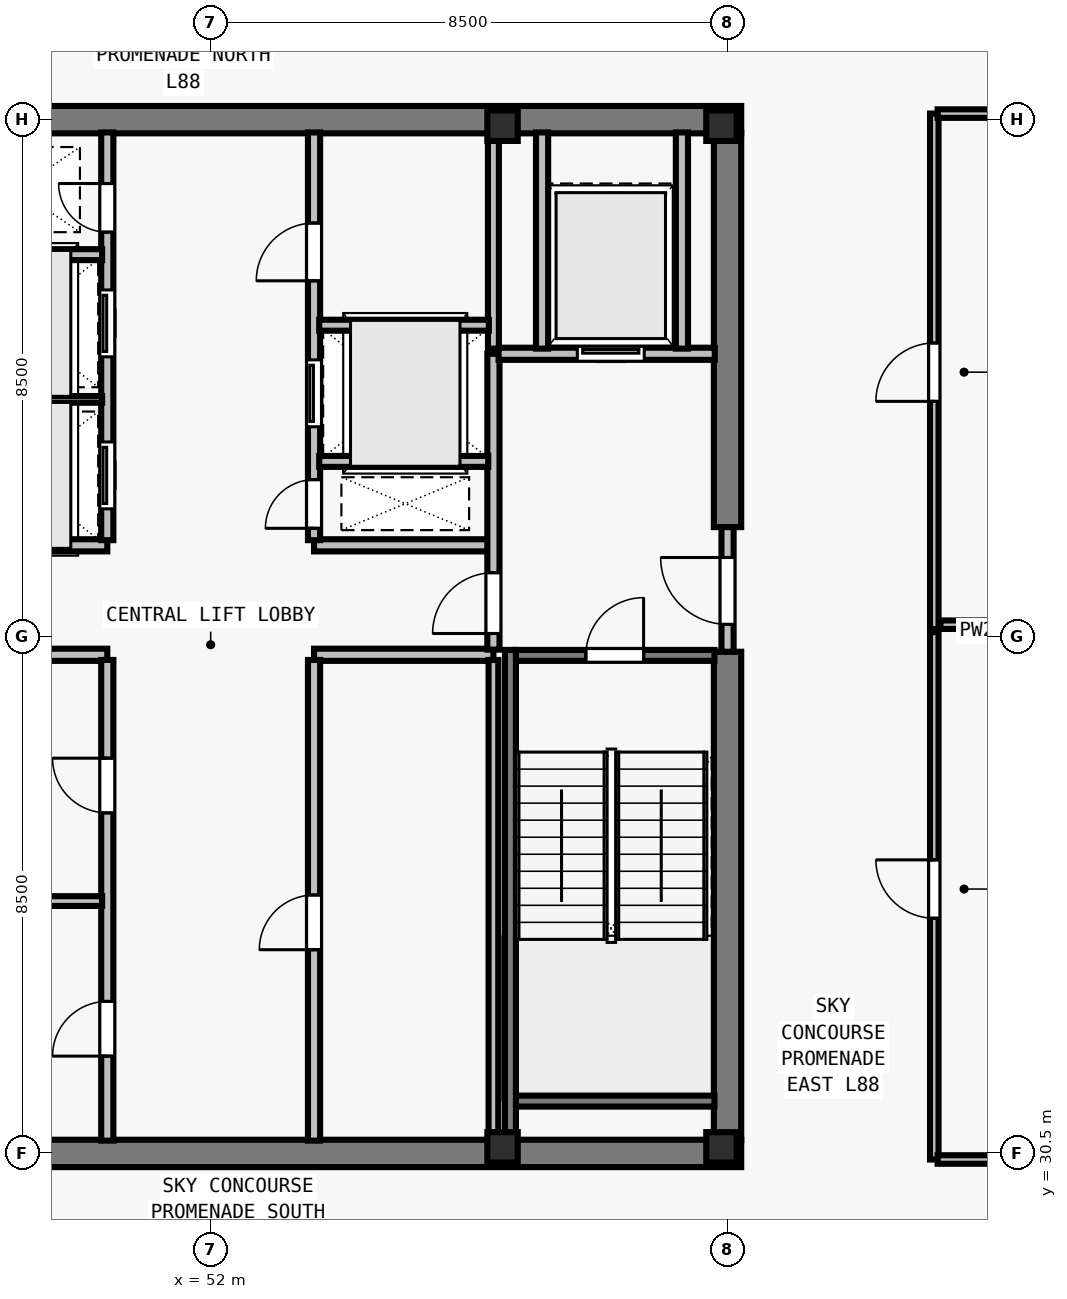
"""IFC4 building model, lengths in metres.
Left out: names, types, materials, properties, quantities, classifications, styles, units other than length and angle.
Written with IfcOpenShell. Run it as: python <this file> out.ifc"""

import sys

from ifc_helpers import new_model, si_unit, direction, frame, frame_2d, origin, origin_2d, place, context, subcontext, project, spatial, rectangle, i_section, extrude, element, fill, save


model = new_model("IFC4")
c1 = context("Model", 3, precision=1e-05, world=origin(), true_north=direction((0.0, 1.0)))
c2 = subcontext(c1, "Body", "Model", "MODEL_VIEW")
j1 = project(units=[si_unit("LENGTHUNIT", "METRE"), si_unit("PLANEANGLEUNIT", "RADIAN")], contexts=[c1])
p1 = place(None, origin())
s1 = spatial("IfcSite", under=j1, at=p1, CompositionType="ELEMENT")
p2 = place(p1, origin())
s2 = spatial("IfcBuilding", under=s1, at=p2, CompositionType="ELEMENT")
p3 = place(p2, frame((0.0, 0.0, 320.0)))
s3 = spatial("IfcBuildingStorey", under=s2, at=p3, CompositionType="ELEMENT", Elevation=320.0)
for number, where, z_axis, x_axis in (
    (1, (56.8, 30.6, 0.0), (0.0, 0.0, 1.0), (1.0, 0.0, 0.0)),
    (2, (60.4, 30.6, 0.0), (0.0, 0.0, 1.0), (1.0, 0.0, 0.0)),
    (3, (56.8, 47.4, 0.0), (0.0, 0.0, 1.0), (1.0, 0.0, 0.0)),
    (4, (60.4, 47.4, 0.0), (0.0, 0.0, 1.0), (1.0, 0.0, 0.0)),
):
    element("IfcColumn", number, at=place(p3, frame(where, z_axis=z_axis, x_axis=x_axis)), inside=s3, PredefinedType="COLUMN", context=c2, shape_type="SweptSolid", body=[
        extrude(i_section(OverallWidth=0.5, OverallDepth=0.5, WebThickness=0.028, FlangeThickness=0.045, at=origin_2d()), origin(), (0.0, 0.0, 1.0), 4.5),
    ])
for number, where, z_axis, x_axis in (
    (5, (43.275, 30.5, 0.0), (0.0, 0.0, 1.0), (1.0, 0.0, 0.0)),
    (6, (43.275, 47.5, 0.0), (0.0, 0.0, 1.0), (1.0, 0.0, 0.0)),
):
    element("IfcWall", number, at=place(p3, frame(where, z_axis=z_axis, x_axis=x_axis)), inside=s3, PredefinedType="SHEAR", context=c2, shape_type="SweptSolid", body=[
        extrude(rectangle(XDim=17.45, YDim=0.45, at=frame_2d((8.725, 0.0))), origin(), (0.0, 0.0, 1.0), 4.25),
    ])
p4 = place(p3, frame((60.5, 30.715, 0.0), z_axis=(0.0, 0.0, 1.0), x_axis=(0.0, 1.0, 0.0)))
e7 = element("IfcWall", 7, at=p4, inside=s3, PredefinedType="SHEAR", context=c2, shape_type="SweptSolid", body=[
    extrude(rectangle(XDim=8.035, YDim=0.45, at=frame_2d((4.018, 0.0))), origin(), (0.0, 0.0, 1.0), 4.25),
])
p5 = place(p3, frame((60.5, 40.8, 0.0), z_axis=(0.0, 0.0, 1.0), x_axis=(0.0, 1.0, 0.0)))
e8 = element("IfcWall", 8, at=p5, inside=s3, PredefinedType="SHEAR", context=c2, shape_type="SweptSolid", body=[
    extrude(rectangle(XDim=6.485, YDim=0.45, at=frame_2d((3.242, 0.0))), origin(), (0.0, 0.0, 1.0), 4.25),
])
for number, where, z_axis, x_axis in (
    (9, (47.35, 38.7, 0.0), (0.0, 0.0, 1.0), (1.0, 0.0, 0.0)),
    (10, (47.35, 40.5, 0.0), (0.0, 0.0, 1.0), (1.0, 0.0, 0.0)),
    (11, (53.7, 38.7, 0.0), (0.0, 0.0, 1.0), (1.0, 0.0, 0.0)),
    (12, (53.7, 40.5, 0.0), (0.0, 0.0, 1.0), (1.0, 0.0, 0.0)),
):
    element("IfcWall", number, at=place(p3, frame(where, z_axis=z_axis, x_axis=x_axis)), inside=s3, PredefinedType="SOLIDWALL", context=c2, shape_type="SweptSolid", body=[
        extrude(rectangle(XDim=2.95, YDim=0.2, at=frame_2d((1.475, 0.0))), origin(), (0.0, 0.0, 1.0), 4.25),
    ])
p6 = place(p3, frame((50.3, 30.71, 0.0), z_axis=(0.0, 0.0, 1.0), x_axis=(0.0, 1.0, 0.0)))
e13 = element("IfcWall", 13, at=p6, inside=s3, PredefinedType="SOLIDWALL", context=c2, shape_type="SweptSolid", body=[
    extrude(rectangle(XDim=7.905, YDim=0.2, at=frame_2d((3.953, 0.0))), origin(), (0.0, 0.0, 1.0), 4.25),
])
p7 = place(p6, frame((1.39, 0.0, 0.0)))
e14 = element("IfcOpeningElement", 14, at=p7, cuts=e13, PredefinedType="OPENING", context=c2, shape_type="SweptSolid", body=[
    extrude(rectangle(XDim=0.9, YDim=2.12, at=frame_2d((0.45, 1.06))), frame((0.0, 0.11, 0.0), z_axis=(0.0, -1.0, 0.0), x_axis=(1.0, 0.0, 0.0)), (0.0, 0.0, 1.0), 0.22),
])
p8 = place(p6, frame((5.39, 0.0, 0.0)))
e15 = element("IfcOpeningElement", 15, at=p8, cuts=e13, PredefinedType="OPENING", context=c2, shape_type="SweptSolid", body=[
    extrude(rectangle(XDim=0.9, YDim=2.12, at=frame_2d((0.45, 1.06))), frame((0.0, 0.11, 0.0), z_axis=(0.0, -1.0, 0.0), x_axis=(1.0, 0.0, 0.0)), (0.0, 0.0, 1.0), 0.22),
])
p9 = place(p3, frame((53.7, 30.71, 0.0), z_axis=(0.0, 0.0, 1.0), x_axis=(0.0, 1.0, 0.0)))
e16 = element("IfcWall", 16, at=p9, inside=s3, PredefinedType="SOLIDWALL", context=c2, shape_type="SweptSolid", body=[
    extrude(rectangle(XDim=7.905, YDim=0.2, at=frame_2d((3.953, 0.0))), origin(), (0.0, 0.0, 1.0), 4.25),
])
p10 = place(p9, frame((3.14, 0.0, 0.0)))
e17 = element("IfcOpeningElement", 17, at=p10, cuts=e16, PredefinedType="OPENING", context=c2, shape_type="SweptSolid", body=[
    extrude(rectangle(XDim=0.9, YDim=2.12, at=frame_2d((0.45, 1.06))), frame((0.0, 0.11, 0.0), z_axis=(0.0, -1.0, 0.0), x_axis=(1.0, 0.0, 0.0)), (0.0, 0.0, 1.0), 0.22),
])
p11 = place(p3, frame((50.3, 40.585, 0.0), z_axis=(0.0, 0.0, 1.0), x_axis=(0.0, 1.0, 0.0)))
e18 = element("IfcWall", 18, at=p11, inside=s3, PredefinedType="SOLIDWALL", context=c2, shape_type="SweptSolid", body=[
    extrude(rectangle(XDim=6.705, YDim=0.2, at=frame_2d((3.353, 0.0))), origin(), (0.0, 0.0, 1.0), 4.25),
])
p12 = place(p11, frame((0.515, 0.0, 0.0)))
e19 = element("IfcOpeningElement", 19, at=p12, cuts=e18, PredefinedType="OPENING", context=c2, shape_type="SweptSolid", body=[
    extrude(rectangle(XDim=1.1, YDim=2.2, at=frame_2d((0.55, 1.1))), frame((0.0, 0.11, 0.0), z_axis=(0.0, -1.0, 0.0), x_axis=(1.0, 0.0, 0.0)), (0.0, 0.0, 1.0), 0.22),
])
p13 = place(p11, frame((3.015, 0.0, 0.0)))
e20 = element("IfcOpeningElement", 20, at=p13, cuts=e18, PredefinedType="OPENING", context=c2, shape_type="SweptSolid", body=[
    extrude(rectangle(XDim=1.1, YDim=2.2, at=frame_2d((0.55, 1.1))), frame((0.0, 0.11, 0.0), z_axis=(0.0, -1.0, 0.0), x_axis=(1.0, 0.0, 0.0)), (0.0, 0.0, 1.0), 0.22),
])
p14 = place(p11, frame((5.065, 0.0, 0.0)))
e21 = element("IfcOpeningElement", 21, at=p14, cuts=e18, PredefinedType="OPENING", context=c2, shape_type="SweptSolid", body=[
    extrude(rectangle(XDim=0.8, YDim=2.08, at=frame_2d((0.4, 1.04))), frame((0.0, 0.11, 0.0), z_axis=(0.0, -1.0, 0.0), x_axis=(1.0, 0.0, 0.0)), (0.0, 0.0, 1.0), 0.22),
])
p15 = place(p3, frame((53.7, 40.585, 0.0), z_axis=(0.0, 0.0, 1.0), x_axis=(0.0, 1.0, 0.0)))
e22 = element("IfcWall", 22, at=p15, inside=s3, PredefinedType="SOLIDWALL", context=c2, shape_type="SweptSolid", body=[
    extrude(rectangle(XDim=6.705, YDim=0.2, at=frame_2d((3.353, 0.0))), origin(), (0.0, 0.0, 1.0), 4.25),
])
p16 = place(p15, frame((0.195, 0.0, 0.0)))
e23 = element("IfcOpeningElement", 23, at=p16, cuts=e22, PredefinedType="OPENING", context=c2, shape_type="SweptSolid", body=[
    extrude(rectangle(XDim=0.8, YDim=2.08, at=frame_2d((0.4, 1.04))), frame((0.0, 0.11, 0.0), z_axis=(0.0, -1.0, 0.0), x_axis=(1.0, 0.0, 0.0)), (0.0, 0.0, 1.0), 0.22),
])
p17 = place(p15, frame((1.865, 0.0, 0.0)))
e24 = element("IfcOpeningElement", 24, at=p17, cuts=e22, PredefinedType="OPENING", context=c2, shape_type="SweptSolid", body=[
    extrude(rectangle(XDim=1.1, YDim=2.2, at=frame_2d((0.55, 1.1))), frame((0.0, 0.11, 0.0), z_axis=(0.0, -1.0, 0.0), x_axis=(1.0, 0.0, 0.0)), (0.0, 0.0, 1.0), 0.22),
])
p18 = place(p15, frame((4.265, 0.0, 0.0)))
e25 = element("IfcOpeningElement", 25, at=p18, cuts=e22, PredefinedType="OPENING", context=c2, shape_type="SweptSolid", body=[
    extrude(rectangle(XDim=0.95, YDim=2.12, at=frame_2d((0.475, 1.06))), frame((0.0, 0.11, 0.0), z_axis=(0.0, -1.0, 0.0), x_axis=(1.0, 0.0, 0.0)), (0.0, 0.0, 1.0), 0.22),
])
p19 = place(p3, frame((60.5, 38.75, 0.0), z_axis=(0.0, 0.0, 1.0), x_axis=(0.0, 1.0, 0.0)))
e26 = element("IfcWall", 26, at=p19, inside=s3, PredefinedType="SOLIDWALL", context=c2, shape_type="SweptSolid", body=[
    extrude(rectangle(XDim=2.05, YDim=0.2, at=frame_2d((1.025, 0.0))), origin(), (0.0, 0.0, 1.0), 4.25),
])
p20 = place(p19, frame((0.45, 0.0, 0.0)))
e27 = element("IfcOpeningElement", 27, at=p20, cuts=e26, PredefinedType="OPENING", context=c2, shape_type="SweptSolid", body=[
    extrude(rectangle(XDim=1.1, YDim=2.15, at=frame_2d((0.55, 1.075))), frame((0.0, 0.11, 0.0), z_axis=(0.0, -1.0, 0.0), x_axis=(1.0, 0.0, 0.0)), (0.0, 0.0, 1.0), 0.22),
])
p21 = place(p3, frame((56.65, 38.785, 0.0), z_axis=(0.0, 0.0, 1.0), x_axis=(0.0, 1.0, 0.0)))
e28 = element("IfcWall", 28, at=p21, inside=s3, PredefinedType="SOLIDWALL", context=c2, shape_type="SweptSolid", body=[
    extrude(rectangle(XDim=4.865, YDim=0.2, at=frame_2d((2.433, 0.0))), origin(), (0.0, 0.0, 1.0), 4.25),
])
p22 = place(p21, frame((0.265, 0.0, 0.0)))
e29 = element("IfcOpeningElement", 29, at=p22, cuts=e28, PredefinedType="OPENING", context=c2, shape_type="SweptSolid", body=[
    extrude(rectangle(XDim=1.0, YDim=2.15, at=frame_2d((0.5, 1.075))), frame((0.0, 0.11, 0.0), z_axis=(0.0, -1.0, 0.0), x_axis=(1.0, 0.0, 0.0)), (0.0, 0.0, 1.0), 0.22),
])
p23 = place(p3, frame((56.735, 43.65, 0.0), z_axis=(0.0, 0.0, 1.0), x_axis=(1.0, 0.0, 0.0)))
e30 = element("IfcWall", 30, at=p23, inside=s3, PredefinedType="SOLIDWALL", context=c2, shape_type="SweptSolid", body=[
    extrude(rectangle(XDim=3.555, YDim=0.2, at=frame_2d((1.777, 0.0))), origin(), (0.0, 0.0, 1.0), 4.25),
])
p24 = place(p23, frame((1.295, 0.0, 0.0)))
e31 = element("IfcOpeningElement", 31, at=p24, cuts=e30, PredefinedType="OPENING", context=c2, shape_type="SweptSolid", body=[
    extrude(rectangle(XDim=1.1, YDim=2.2, at=frame_2d((0.55, 1.1))), frame((0.0, 0.11, 0.0), z_axis=(0.0, -1.0, 0.0), x_axis=(1.0, 0.0, 0.0)), (0.0, 0.0, 1.0), 0.22),
])
for number, where, z_axis, x_axis in (
    (32, (57.45, 43.735, 0.0), (0.0, 0.0, 1.0), (0.0, 1.0, 0.0)),
    (33, (59.75, 43.735, 0.0), (0.0, 0.0, 1.0), (0.0, 1.0, 0.0)),
):
    element("IfcWall", number, at=place(p3, frame(where, z_axis=z_axis, x_axis=x_axis)), inside=s3, PredefinedType="SOLIDWALL", context=c2, shape_type="SweptSolid", body=[
        extrude(rectangle(XDim=3.555, YDim=0.2, at=frame_2d((1.777, 0.0))), origin(), (0.0, 0.0, 1.0), 4.25),
    ])
p25 = place(p3, frame((47.415, 34.65, 0.0), z_axis=(0.0, 0.0, 1.0), x_axis=(1.0, 0.0, 0.0)))
e34 = element("IfcWall", 34, at=p25, inside=s3, PredefinedType="PARTITIONING", context=c2, shape_type="SweptSolid", body=[
    extrude(rectangle(XDim=2.8, YDim=0.16, at=frame_2d((1.4, 0.0))), origin(), (0.0, 0.0, 1.0), 4.25),
])
p26 = place(p3, frame((56.65, 30.71, 0.0), z_axis=(0.0, 0.0, 1.0), x_axis=(0.0, 1.0, 0.0)))
e35 = element("IfcWall", 35, at=p26, inside=s3, PredefinedType="PARTITIONING", context=c2, shape_type="SweptSolid", body=[
    extrude(rectangle(XDim=7.905, YDim=0.16, at=frame_2d((3.953, 0.0))), origin(), (0.0, 0.0, 1.0), 4.25),
])
p27 = place(p3, frame((47.435, 42.9, 0.0), z_axis=(0.0, 0.0, 1.0), x_axis=(1.0, 0.0, 0.0)))
e36 = element("IfcWall", 36, at=p27, inside=s3, PredefinedType="PARTITIONING", context=c2, shape_type="SweptSolid", body=[
    extrude(rectangle(XDim=2.78, YDim=0.11, at=frame_2d((1.39, 0.0))), origin(), (0.0, 0.0, 1.0), 4.25),
])
p28 = place(p3, frame((47.425, 45.28, 0.0), z_axis=(0.0, 0.0, 1.0), x_axis=(1.0, 0.0, 0.0)))
e37 = element("IfcWall", 37, at=p28, inside=s3, PredefinedType="SOLIDWALL", context=c2, shape_type="SweptSolid", body=[
    extrude(rectangle(XDim=2.79, YDim=0.18, at=frame_2d((1.395, 0.0))), origin(), (0.0, 0.0, 1.0), 4.25),
])
p29 = place(p3, frame((56.65, 43.735, 0.0), z_axis=(0.0, 0.0, 1.0), x_axis=(0.0, 1.0, 0.0)))
e38 = element("IfcWall", 38, at=p29, inside=s3, PredefinedType="SOLIDWALL", context=c2, shape_type="SweptSolid", body=[
    extrude(rectangle(XDim=3.555, YDim=0.18, at=frame_2d((1.777, 0.0))), origin(), (0.0, 0.0, 1.0), 4.25),
])
p30 = place(p3, frame((53.785, 41.88, 0.0), z_axis=(0.0, 0.0, 1.0), x_axis=(1.0, 0.0, 0.0)))
e39 = element("IfcWall", 39, at=p30, inside=s3, PredefinedType="SOLIDWALL", context=c2, shape_type="SweptSolid", body=[
    extrude(rectangle(XDim=2.78, YDim=0.18, at=frame_2d((1.39, 0.0))), origin(), (0.0, 0.0, 1.0), 4.25),
])
p31 = place(p3, frame((53.785, 44.12, 0.0), z_axis=(0.0, 0.0, 1.0), x_axis=(1.0, 0.0, 0.0)))
e40 = element("IfcWall", 40, at=p31, inside=s3, PredefinedType="SOLIDWALL", context=c2, shape_type="SweptSolid", body=[
    extrude(rectangle(XDim=2.79, YDim=0.18, at=frame_2d((1.395, 0.0))), origin(), (0.0, 0.0, 1.0), 4.25),
])
p32 = place(p3, frame((63.9, 30.4, 0.0), z_axis=(0.0, 0.0, 1.0), x_axis=(0.0, 1.0, 0.0)))
e41 = element("IfcWall", 41, at=p32, inside=s3, PredefinedType="PARTITIONING", context=c2, shape_type="SweptSolid", body=[
    extrude(rectangle(XDim=17.2, YDim=0.14, at=frame_2d((8.6, 0.0))), origin(), (0.0, 0.0, 1.0), 4.25),
])
p33 = place(p32, frame((3.968, 0.0, 0.0)))
e42 = element("IfcOpeningElement", 42, at=p33, cuts=e41, PredefinedType="OPENING", context=c2, shape_type="SweptSolid", body=[
    extrude(rectangle(XDim=0.96, YDim=2.12, at=frame_2d((0.48, 1.06))), frame((0.0, 0.08, 0.0), z_axis=(0.0, -1.0, 0.0), x_axis=(1.0, 0.0, 0.0)), (0.0, 0.0, 1.0), 0.16),
])
p34 = place(p32, frame((12.468, 0.0, 0.0)))
e43 = element("IfcOpeningElement", 43, at=p34, cuts=e41, PredefinedType="OPENING", context=c2, shape_type="SweptSolid", body=[
    extrude(rectangle(XDim=0.96, YDim=2.12, at=frame_2d((0.48, 1.06))), frame((0.0, 0.08, 0.0), z_axis=(0.0, -1.0, 0.0), x_axis=(1.0, 0.0, 0.0)), (0.0, 0.0, 1.0), 0.16),
])
for number, where, z_axis, x_axis in (
    (44, (63.955, 30.4, 0.0), (0.0, 0.0, 1.0), (1.0, 0.0, 0.0)),
    (45, (63.955, 47.6, 0.0), (0.0, 0.0, 1.0), (1.0, 0.0, 0.0)),
):
    element("IfcWall", number, at=place(p3, frame(where, z_axis=z_axis, x_axis=x_axis)), inside=s3, PredefinedType="PARTITIONING", context=c2, shape_type="SweptSolid", body=[
        extrude(rectangle(XDim=8.76, YDim=0.14, at=frame_2d((4.38, 0.0))), origin(), (0.0, 0.0, 1.0), 2.425),
    ])
p35 = place(p3, frame((64.0, 39.195, 0.0), z_axis=(0.0, 0.0, 1.0), x_axis=(1.0, 0.0, 0.0)))
e46 = element("IfcWall", 46, at=p35, inside=s3, PredefinedType="PARTITIONING", context=c2, shape_type="SweptSolid", body=[
    extrude(rectangle(XDim=8.83, YDim=0.14, at=frame_2d((4.415, 0.0))), origin(), (0.0, 0.0, 1.0), 4.25),
])
p36 = place(p3, frame((57.005, 38.69, 0.0), z_axis=(0.0, 0.0, 1.0), x_axis=(1.0, 0.0, 0.0)))
e47 = element("IfcWall", 47, at=p36, inside=s3, PredefinedType="SOLIDWALL", context=c2, shape_type="SweptSolid", body=[
    extrude(rectangle(XDim=3.28, YDim=0.18, at=frame_2d((1.64, 0.0))), origin(), (0.0, 0.0, 1.0), 4.25),
])
p37 = place(p36, frame((1.165, 0.0, 0.0)))
e48 = element("IfcOpeningElement", 48, at=p37, cuts=e47, PredefinedType="OPENING", context=c2, shape_type="SweptSolid", body=[
    extrude(rectangle(XDim=0.95, YDim=2.15, at=frame_2d((0.475, 1.075))), frame((0.0, 0.1, 0.0), z_axis=(0.0, -1.0, 0.0), x_axis=(1.0, 0.0, 0.0)), (0.0, 0.0, 1.0), 0.2),
])
p38 = place(p3, frame((57.005, 31.36, 0.0), z_axis=(0.0, 0.0, 1.0), x_axis=(1.0, 0.0, 0.0)))
e49 = element("IfcWall", 49, at=p38, inside=s3, PredefinedType="SOLIDWALL", context=c2, shape_type="SweptSolid", body=[
    extrude(rectangle(XDim=3.28, YDim=0.18, at=frame_2d((1.64, 0.0))), origin(), (0.0, 0.0, 1.0), 4.25),
])
p39 = place(p3, frame((56.93, 38.78, 0.0), z_axis=(0.0, 0.0, 1.0), x_axis=(0.0, -1.0, 0.0)))
e50 = element("IfcWall", 50, at=p39, inside=s3, PredefinedType="SOLIDWALL", context=c2, shape_type="SweptSolid", body=[
    extrude(rectangle(XDim=8.067, YDim=0.18, at=frame_2d((4.034, 0.0))), origin(), (0.0, 0.0, 1.0), 4.25),
])
p40 = place(p20, origin())
e51 = element("IfcDoor", 51, at=p40, inside=s3, OperationType="SINGLE_SWING_RIGHT", PredefinedType="DOOR", context=c2, shape_type="SweptSolid", body=[
    extrude(rectangle(XDim=1.1, YDim=2.15, at=frame_2d((0.55, 1.075))), frame((0.0, 0.025, 0.0), z_axis=(0.0, -1.0, 0.0), x_axis=(1.0, 0.0, 0.0)), (0.0, 0.0, 1.0), 0.05),
])
fill(e27, e51)
p41 = place(p22, origin())
e52 = element("IfcDoor", 52, at=p41, inside=s3, OperationType="SINGLE_SWING_LEFT", PredefinedType="DOOR", context=c2, shape_type="SweptSolid", body=[
    extrude(rectangle(XDim=1.0, YDim=2.15, at=frame_2d((0.5, 1.075))), frame((0.0, 0.025, 0.0), z_axis=(0.0, -1.0, 0.0), x_axis=(1.0, 0.0, 0.0)), (0.0, 0.0, 1.0), 0.05),
])
fill(e29, e52)
p42 = place(p24, origin())
e53 = element("IfcDoor", 53, at=p42, inside=s3, OperationType="SLIDING_TO_LEFT", PredefinedType="DOOR", context=c2, shape_type="SweptSolid", body=[
    extrude(rectangle(XDim=1.1, YDim=2.2, at=frame_2d((0.55, 1.1))), frame((0.0, 0.025, 0.0), z_axis=(0.0, -1.0, 0.0), x_axis=(1.0, 0.0, 0.0)), (0.0, 0.0, 1.0), 0.05),
])
fill(e31, e53)
p43 = place(p7, origin())
e54 = element("IfcDoor", 54, at=p43, inside=s3, OperationType="SINGLE_SWING_LEFT", PredefinedType="DOOR", context=c2, shape_type="SweptSolid", body=[
    extrude(rectangle(XDim=0.9, YDim=2.12, at=frame_2d((0.45, 1.06))), frame((0.0, 0.025, 0.0), z_axis=(0.0, -1.0, 0.0), x_axis=(1.0, 0.0, 0.0)), (0.0, 0.0, 1.0), 0.05),
])
fill(e14, e54)
p44 = place(p8, origin())
e55 = element("IfcDoor", 55, at=p44, inside=s3, OperationType="SINGLE_SWING_RIGHT", PredefinedType="DOOR", context=c2, shape_type="SweptSolid", body=[
    extrude(rectangle(XDim=0.9, YDim=2.12, at=frame_2d((0.45, 1.06))), frame((0.0, 0.025, 0.0), z_axis=(0.0, -1.0, 0.0), x_axis=(1.0, 0.0, 0.0)), (0.0, 0.0, 1.0), 0.05),
])
fill(e15, e55)
p45 = place(p10, origin())
e56 = element("IfcDoor", 56, at=p45, inside=s3, OperationType="SINGLE_SWING_LEFT", PredefinedType="DOOR", context=c2, shape_type="SweptSolid", body=[
    extrude(rectangle(XDim=0.9, YDim=2.12, at=frame_2d((0.45, 1.06))), frame((0.0, 0.025, 0.0), z_axis=(0.0, -1.0, 0.0), x_axis=(1.0, 0.0, 0.0)), (0.0, 0.0, 1.0), 0.05),
])
fill(e17, e56)
p46 = place(p12, origin())
e57 = element("IfcDoor", 57, at=p46, inside=s3, OperationType="SLIDING_TO_LEFT", PredefinedType="DOOR", context=c2, shape_type="SweptSolid", body=[
    extrude(rectangle(XDim=1.1, YDim=2.2, at=frame_2d((0.55, 1.1))), frame((0.0, 0.025, 0.0), z_axis=(0.0, -1.0, 0.0), x_axis=(1.0, 0.0, 0.0)), (0.0, 0.0, 1.0), 0.05),
])
fill(e19, e57)
p47 = place(p13, origin())
e58 = element("IfcDoor", 58, at=p47, inside=s3, OperationType="SLIDING_TO_LEFT", PredefinedType="DOOR", context=c2, shape_type="SweptSolid", body=[
    extrude(rectangle(XDim=1.1, YDim=2.2, at=frame_2d((0.55, 1.1))), frame((0.0, 0.025, 0.0), z_axis=(0.0, -1.0, 0.0), x_axis=(1.0, 0.0, 0.0)), (0.0, 0.0, 1.0), 0.05),
])
fill(e20, e58)
p48 = place(p14, origin())
e59 = element("IfcDoor", 59, at=p48, inside=s3, OperationType="SINGLE_SWING_RIGHT", PredefinedType="DOOR", context=c2, shape_type="SweptSolid", body=[
    extrude(rectangle(XDim=0.8, YDim=2.08, at=frame_2d((0.4, 1.04))), frame((0.0, 0.025, 0.0), z_axis=(0.0, -1.0, 0.0), x_axis=(1.0, 0.0, 0.0)), (0.0, 0.0, 1.0), 0.05),
])
fill(e21, e59)
p49 = place(p16, origin())
e60 = element("IfcDoor", 60, at=p49, inside=s3, OperationType="SINGLE_SWING_LEFT", PredefinedType="DOOR", context=c2, shape_type="SweptSolid", body=[
    extrude(rectangle(XDim=0.8, YDim=2.08, at=frame_2d((0.4, 1.04))), frame((0.0, 0.025, 0.0), z_axis=(0.0, -1.0, 0.0), x_axis=(1.0, 0.0, 0.0)), (0.0, 0.0, 1.0), 0.05),
])
fill(e23, e60)
p50 = place(p17, origin())
e61 = element("IfcDoor", 61, at=p50, inside=s3, OperationType="SLIDING_TO_LEFT", PredefinedType="DOOR", context=c2, shape_type="SweptSolid", body=[
    extrude(rectangle(XDim=1.1, YDim=2.2, at=frame_2d((0.55, 1.1))), frame((0.0, 0.025, 0.0), z_axis=(0.0, -1.0, 0.0), x_axis=(1.0, 0.0, 0.0)), (0.0, 0.0, 1.0), 0.05),
])
fill(e24, e61)
p51 = place(p18, origin())
e62 = element("IfcDoor", 62, at=p51, inside=s3, OperationType="SINGLE_SWING_LEFT", PredefinedType="DOOR", context=c2, shape_type="SweptSolid", body=[
    extrude(rectangle(XDim=0.95, YDim=2.12, at=frame_2d((0.475, 1.06))), frame((0.0, 0.025, 0.0), z_axis=(0.0, -1.0, 0.0), x_axis=(1.0, 0.0, 0.0)), (0.0, 0.0, 1.0), 0.05),
])
fill(e25, e62)
p52 = place(p33, origin())
e63 = element("IfcDoor", 63, at=p52, inside=s3, OperationType="SINGLE_SWING_RIGHT", PredefinedType="DOOR", context=c2, shape_type="SweptSolid", body=[
    extrude(rectangle(XDim=0.96, YDim=2.12, at=frame_2d((0.48, 1.06))), frame((0.0, 0.025, 0.0), z_axis=(0.0, -1.0, 0.0), x_axis=(1.0, 0.0, 0.0)), (0.0, 0.0, 1.0), 0.05),
])
fill(e42, e63)
p53 = place(p34, origin())
e64 = element("IfcDoor", 64, at=p53, inside=s3, OperationType="SINGLE_SWING_LEFT", PredefinedType="DOOR", context=c2, shape_type="SweptSolid", body=[
    extrude(rectangle(XDim=0.96, YDim=2.12, at=frame_2d((0.48, 1.06))), frame((0.0, 0.025, 0.0), z_axis=(0.0, -1.0, 0.0), x_axis=(1.0, 0.0, 0.0)), (0.0, 0.0, 1.0), 0.05),
])
fill(e43, e64)
p54 = place(p37, origin())
e65 = element("IfcDoor", 65, at=p54, inside=s3, OperationType="SINGLE_SWING_RIGHT", PredefinedType="DOOR", context=c2, shape_type="SweptSolid", body=[
    extrude(rectangle(XDim=0.95, YDim=2.15, at=frame_2d((0.475, 1.075))), frame((0.0, 0.025, 0.0), z_axis=(0.0, -1.0, 0.0), x_axis=(1.0, 0.0, 0.0)), (0.0, 0.0, 1.0), 0.05),
])
fill(e48, e65)
save(model, sys.argv[1])
